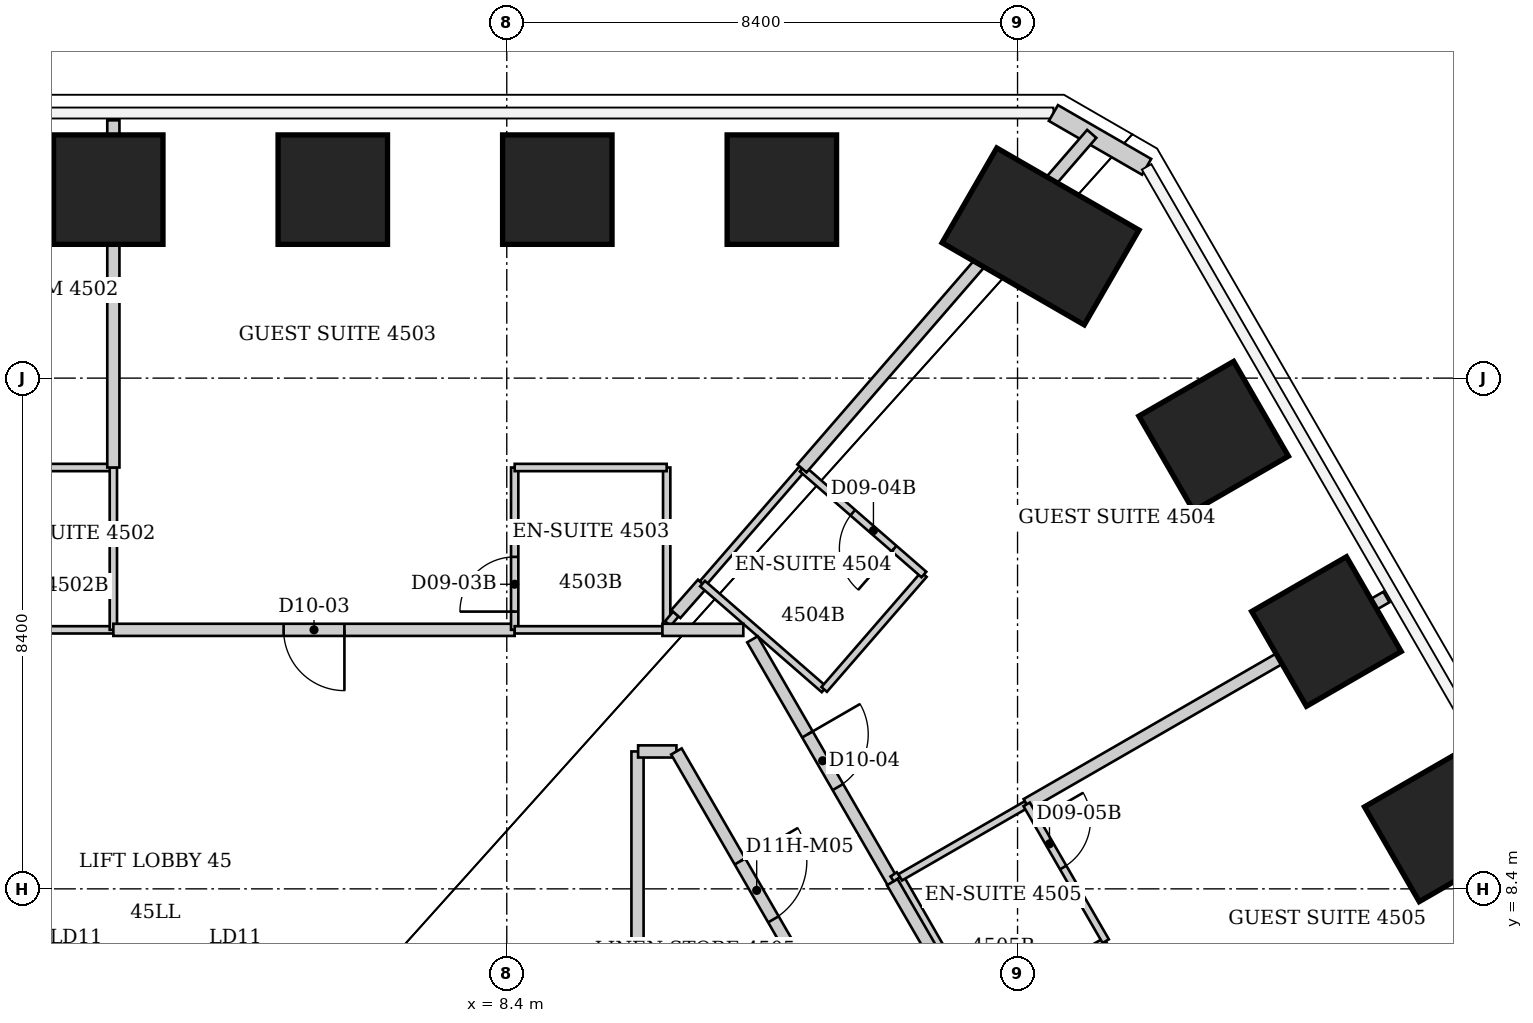
"""IFC4 building model, lengths in metres.
Left out: names, types, materials, properties, quantities, classifications, styles, units other than length and angle.
Written with IfcOpenShell. Run it as: python <this file> out.ifc"""

import sys

from ifc_helpers import new_model, si_unit, direction, frame, frame_2d, origin, origin_2d, place, context, subcontext, project, spatial, rectangle, extrude, element, fill, save


model = new_model("IFC4")
c1 = context("Model", 3, precision=1e-05, world=origin(), true_north=direction((0.0, 1.0)))
c2 = subcontext(c1, "Body", "Model", "MODEL_VIEW")
j1 = project(units=[si_unit("LENGTHUNIT", "METRE"), si_unit("PLANEANGLEUNIT", "RADIAN")], contexts=[c1])
p1 = place(None, origin())
s1 = spatial("IfcSite", under=j1, at=p1, CompositionType="ELEMENT")
p2 = place(p1, origin())
s2 = spatial("IfcBuilding", under=s1, at=p2, CompositionType="ELEMENT")
p3 = place(p2, frame((0.0, 0.0, 183.2)))
s3 = spatial("IfcBuildingStorey", under=s2, at=p3, CompositionType="ELEMENT", Elevation=183.2)
for number, where, z_axis, x_axis in (
    (1, (1.846, 19.9, 0.0), (0.0, 0.0, 1.0), (0.0, 1.0, 0.0)),
    (2, (5.539, 19.9, 0.0), (0.0, 0.0, 1.0), (0.0, 1.0, 0.0)),
    (3, (9.231, 19.9, 0.0), (0.0, 0.0, 1.0), (0.0, 1.0, 0.0)),
    (4, (12.924, 19.9, 0.0), (0.0, 0.0, 1.0), (0.0, 1.0, 0.0)),
):
    element("IfcColumn", number, at=place(p3, frame(where, z_axis=z_axis, x_axis=x_axis)), inside=s3, PredefinedType="COLUMN", context=c2, shape_type="SweptSolid", body=[
        extrude(rectangle(XDim=1.8, YDim=1.8, at=origin_2d()), origin(), (0.0, 0.0, 1.0), 3.8),
    ])
p4 = place(p3, frame((17.178, 19.131, 0.0), z_axis=(0.0, 0.0, 1.0), x_axis=(0.5, 0.866025403784, 0.0)))
e5 = element("IfcColumn", 5, at=p4, inside=s3, PredefinedType="COLUMN", context=c2, shape_type="SweptSolid", body=[
    extrude(rectangle(XDim=1.8, YDim=2.7, at=origin_2d()), origin(), (0.0, 0.0, 1.0), 3.8),
])
for number, where, z_axis, x_axis in (
    (6, (20.025, 15.846, 0.0), (0.0, 0.0, 1.0), (0.866, 0.5, 0.0)),
    (7, (21.88, 12.633, 0.0), (0.0, 0.0, 1.0), (0.866, 0.5, 0.0)),
    (8, (23.735, 9.419, 0.0), (0.0, 0.0, 1.0), (0.866, 0.5, 0.0)),
):
    element("IfcColumn", number, at=place(p3, frame(where, z_axis=z_axis, x_axis=x_axis)), inside=s3, PredefinedType="COLUMN", context=c2, shape_type="SweptSolid", body=[
        extrude(rectangle(XDim=1.8, YDim=1.8, at=origin_2d()), origin(), (0.0, 0.0, 1.0), 3.8),
    ])
p5 = place(p3, frame((17.39, 21.16, 0.0), z_axis=(0.0, 0.0, 1.0), x_axis=(0.866036293601, -0.499981137809, 0.0)))
e9 = element("IfcWall", 9, at=p5, inside=s3, PredefinedType="SOLIDWALL", context=c2, shape_type="SweptSolid", body=[
    extrude(rectangle(XDim=1.77, YDim=0.3, at=frame_2d((0.885, 0.0))), origin(), (0.0, 0.0, 1.0), 3.64),
])
for number, where, z_axis, x_axis in (
    (10, (1.93, 12.66, 0.0), (0.0, 0.0, 1.0), (-1.0, 0.0, 0.0)),
    (11, (1.93, 15.33, 0.0), (0.0, 0.0, 1.0), (-1.0, 0.0, 0.0)),
):
    element("IfcWall", number, at=place(p3, frame(where, z_axis=z_axis, x_axis=x_axis)), inside=s3, PredefinedType="PARTITIONING", context=c2, shape_type="SweptSolid", body=[
        extrude(rectangle(XDim=2.45, YDim=0.12, at=frame_2d((1.225, 0.0))), origin(), (0.0, 0.0, 1.0), 3.64),
    ])
p6 = place(p3, frame((1.93, 15.33, 0.0), z_axis=(0.0, 0.0, 1.0), x_axis=(0.0, -1.0, 0.0)))
e12 = element("IfcWall", 12, at=p6, inside=s3, PredefinedType="PARTITIONING", context=c2, shape_type="SweptSolid", body=[
    extrude(rectangle(XDim=2.67, YDim=0.12, at=frame_2d((1.335, 0.0))), origin(), (0.0, 0.0, 1.0), 3.023),
])
p7 = place(p3, frame((1.93, 21.04, 0.0), z_axis=(0.0, 0.0, 1.0), x_axis=(0.0, -1.0, 0.0)))
e13 = element("IfcWall", 13, at=p7, inside=s3, PredefinedType="PARTITIONING", context=c2, shape_type="SweptSolid", body=[
    extrude(rectangle(XDim=5.71, YDim=0.2, at=frame_2d((2.855, 0.0))), origin(), (0.0, 0.0, 1.0), 3.023),
])
p8 = place(p3, frame((8.53, 12.66, 0.0), z_axis=(0.0, 0.0, 1.0), x_axis=(-1.0, 0.0, 0.0)))
e14 = element("IfcWall", 14, at=p8, inside=s3, PredefinedType="PARTITIONING", context=c2, shape_type="SweptSolid", body=[
    extrude(rectangle(XDim=6.6, YDim=0.2, at=frame_2d((3.3, 0.0))), origin(), (0.0, 0.0, 1.0), 3.64),
])
p9 = place(p8, frame((2.8, 0.0, 0.0)))
e15 = element("IfcOpeningElement", 15, at=p9, cuts=e14, PredefinedType="OPENING", context=c2, shape_type="SweptSolid", body=[
    extrude(rectangle(XDim=1.0, YDim=2.13, at=frame_2d((0.5, 1.065))), frame((0.0, 0.1, 0.0), z_axis=(0.0, -1.0, 0.0), x_axis=(1.0, 0.0, 0.0)), (0.0, 0.0, 1.0), 0.2),
])
p10 = place(p3, frame((8.53, 15.33, 0.0), z_axis=(0.0, 0.0, 1.0), x_axis=(0.0, -1.0, 0.0)))
e16 = element("IfcWall", 16, at=p10, inside=s3, PredefinedType="PARTITIONING", context=c2, shape_type="SweptSolid", body=[
    extrude(rectangle(XDim=2.67, YDim=0.12, at=frame_2d((1.335, 0.0))), origin(), (0.0, 0.0, 1.0), 3.64),
])
p11 = place(p10, frame((1.47, 0.0, 0.0)))
e17 = element("IfcOpeningElement", 17, at=p11, cuts=e16, PredefinedType="OPENING", context=c2, shape_type="SweptSolid", body=[
    extrude(rectangle(XDim=0.9, YDim=2.03, at=frame_2d((0.45, 1.015))), frame((0.0, 0.06, 0.0), z_axis=(0.0, -1.0, 0.0), x_axis=(1.0, 0.0, 0.0)), (0.0, 0.0, 1.0), 0.12),
])
p12 = place(p3, frame((10.55, 6.09, 0.0), z_axis=(0.0, 0.0, 1.0), x_axis=(0.0, 1.0, 0.0)))
e18 = element("IfcWall", 18, at=p12, inside=s3, PredefinedType="PARTITIONING", context=c2, shape_type="SweptSolid", body=[
    extrude(rectangle(XDim=4.57, YDim=0.2, at=frame_2d((2.285, 0.0))), origin(), (0.0, 0.0, 1.0), 3.64),
])
p13 = place(p3, frame((10.56, 10.66, 0.0), z_axis=(0.0, 0.0, 1.0), x_axis=(1.0, 0.0, 0.0)))
e19 = element("IfcWall", 19, at=p13, inside=s3, PredefinedType="PARTITIONING", context=c2, shape_type="SweptSolid", body=[
    extrude(rectangle(XDim=0.63, YDim=0.2, at=frame_2d((0.315, 0.0))), origin(), (0.0, 0.0, 1.0), 3.64),
])
p14 = place(p3, frame((10.96, 12.66, 0.0), z_axis=(0.0, 0.0, 1.0), x_axis=(-1.0, 0.0, 0.0)))
e20 = element("IfcWall", 20, at=p14, inside=s3, PredefinedType="PARTITIONING", context=c2, shape_type="SweptSolid", body=[
    extrude(rectangle(XDim=2.43, YDim=0.12, at=frame_2d((1.215, 0.0))), origin(), (0.0, 0.0, 1.0), 3.64),
])
p15 = place(p3, frame((11.03, 12.74, 0.0), z_axis=(0.0, 0.0, 1.0), x_axis=(0.0, 1.0, 0.0)))
e21 = element("IfcWall", 21, at=p15, inside=s3, PredefinedType="PARTITIONING", context=c2, shape_type="SweptSolid", body=[
    extrude(rectangle(XDim=2.59, YDim=0.12, at=frame_2d((1.295, 0.0))), origin(), (0.0, 0.0, 1.0), 3.038),
])
p16 = place(p3, frame((11.03, 15.33, 0.0), z_axis=(0.0, 0.0, 1.0), x_axis=(-1.0, 0.0, 0.0)))
e22 = element("IfcWall", 22, at=p16, inside=s3, PredefinedType="PARTITIONING", context=c2, shape_type="SweptSolid", body=[
    extrude(rectangle(XDim=2.5, YDim=0.12, at=frame_2d((1.25, 0.0))), origin(), (0.0, 0.0, 1.0), 3.64),
])
p17 = place(p3, frame((11.049, 12.763, 0.0), z_axis=(0.0, 0.0, 1.0), x_axis=(0.639596257895, 0.768711016499, 0.0)))
e23 = element("IfcWall", 23, at=p17, inside=s3, PredefinedType="PARTITIONING", context=c2, shape_type="SweptSolid", body=[
    extrude(rectangle(XDim=0.204, YDim=0.12, at=frame_2d((0.102, 0.0))), origin(), (0.0, 0.0, 1.0), 3.64),
])
p18 = place(p3, frame((11.18, 12.92, 0.0), z_axis=(0.0, 0.0, 1.0), x_axis=(0.660578310858, 0.750757147967, 0.0)))
e24 = element("IfcWall", 24, at=p18, inside=s3, PredefinedType="PARTITIONING", context=c2, shape_type="SweptSolid", body=[
    extrude(rectangle(XDim=0.666, YDim=0.2, at=frame_2d((0.333, 0.0))), origin(), (0.0, 0.0, 1.0), 3.64),
])
p19 = place(p3, frame((11.19, 10.66, 0.0), z_axis=(0.0, 0.0, 1.0), x_axis=(0.500248310865, -0.865881993967, 0.0)))
e25 = element("IfcWall", 25, at=p19, inside=s3, PredefinedType="PARTITIONING", context=c2, shape_type="SweptSolid", body=[
    extrude(rectangle(XDim=5.278, YDim=0.2, at=frame_2d((2.639, 0.0))), origin(), (0.0, 0.0, 1.0), 3.64),
])
p20 = place(p19, frame((2.089, 0.0, 0.0)))
e26 = element("IfcOpeningElement", 26, at=p20, cuts=e25, PredefinedType="OPENING", context=c2, shape_type="SweptSolid", body=[
    extrude(rectangle(XDim=1.1, YDim=2.2, at=frame_2d((0.55, 1.1))), frame((0.0, 0.1, 0.0), z_axis=(0.0, -1.0, 0.0), x_axis=(1.0, 0.0, 0.0)), (0.0, 0.0, 1.0), 0.2),
])
p21 = place(p3, frame((11.62, 13.42, 0.0), z_axis=(0.0, 0.0, 1.0), x_axis=(0.655335308977, 0.755338091723, 0.0)))
e27 = element("IfcWall", 27, at=p21, inside=s3, PredefinedType="PARTITIONING", context=c2, shape_type="SweptSolid", body=[
    extrude(rectangle(XDim=2.502, YDim=0.12, at=frame_2d((1.251, 0.0))), origin(), (0.0, 0.0, 1.0), 3.64),
])
p22 = place(p3, frame((11.62, 13.42, 0.0), z_axis=(0.0, 0.0, 1.0), x_axis=(0.754444902764, -0.656363381591, 0.0)))
e28 = element("IfcWall", 28, at=p22, inside=s3, PredefinedType="PARTITIONING", context=c2, shape_type="SweptSolid", body=[
    extrude(rectangle(XDim=2.651, YDim=0.12, at=frame_2d((1.325, 0.0))), origin(), (0.0, 0.0, 1.0), 3.64),
])
p23 = place(p3, frame((12.29, 12.66, 0.0), z_axis=(0.0, 0.0, 1.0), x_axis=(-1.0, 0.0, 0.0)))
e29 = element("IfcWall", 29, at=p23, inside=s3, PredefinedType="PARTITIONING", context=c2, shape_type="SweptSolid", body=[
    extrude(rectangle(XDim=1.33, YDim=0.2, at=frame_2d((0.665, 0.0))), origin(), (0.0, 0.0, 1.0), 3.64),
])
p24 = place(p3, frame((12.44, 12.504, 0.0), z_axis=(0.0, 0.0, 1.0), x_axis=(0.500616963614, -0.865668906535, 0.0)))
e30 = element("IfcWall", 30, at=p24, inside=s3, PredefinedType="PARTITIONING", context=c2, shape_type="SweptSolid", body=[
    extrude(rectangle(XDim=4.614, YDim=0.2, at=frame_2d((2.307, 0.0))), origin(), (0.0, 0.0, 1.0), 3.64),
])
p25 = place(p24, frame((1.807, 0.0, 0.0)))
e31 = element("IfcOpeningElement", 31, at=p25, cuts=e30, PredefinedType="OPENING", context=c2, shape_type="SweptSolid", body=[
    extrude(rectangle(XDim=1.0, YDim=2.13, at=frame_2d((0.5, 1.065))), frame((0.0, 0.1, 0.0), z_axis=(0.0, -1.0, 0.0), x_axis=(1.0, 0.0, 0.0)), (0.0, 0.0, 1.0), 0.2),
])
p26 = place(p3, frame((13.62, 11.68, 0.0), z_axis=(0.0, 0.0, 1.0), x_axis=(0.655335308977, 0.755338091723, 0.0)))
e32 = element("IfcWall", 32, at=p26, inside=s3, PredefinedType="PARTITIONING", context=c2, shape_type="SweptSolid", body=[
    extrude(rectangle(XDim=2.502, YDim=0.12, at=frame_2d((1.251, 0.0))), origin(), (0.0, 0.0, 1.0), 3.64),
])
p27 = place(p3, frame((14.767, 8.521, 0.0), z_axis=(0.0, 0.0, 1.0), x_axis=(0.831142316784, 0.55605975331, 0.0)))
e33 = element("IfcWall", 33, at=p27, inside=s3, PredefinedType="PARTITIONING", context=c2, shape_type="SweptSolid", body=[
    extrude(rectangle(XDim=0.124, YDim=0.2, at=frame_2d((0.062, 0.0))), origin(), (0.0, 0.0, 1.0), 3.64),
])
p28 = place(p3, frame((14.87, 8.59, 0.0), z_axis=(0.0, 0.0, 1.0), x_axis=(0.498557331759, -0.866856728041, 0.0)))
e34 = element("IfcWall", 34, at=p28, inside=s3, PredefinedType="PARTITIONING", context=c2, shape_type="SweptSolid", body=[
    extrude(rectangle(XDim=2.607, YDim=0.12, at=frame_2d((1.304, 0.0))), origin(), (0.0, 0.0, 1.0), 3.64),
])
p29 = place(p3, frame((14.87, 8.59, 0.0), z_axis=(0.0, 0.0, 1.0), x_axis=(0.866177122335, 0.499737123639, 0.0)))
e35 = element("IfcWall", 35, at=p29, inside=s3, PredefinedType="PARTITIONING", context=c2, shape_type="SweptSolid", body=[
    extrude(rectangle(XDim=2.401, YDim=0.12, at=frame_2d((1.201, 0.0))), origin(), (0.0, 0.0, 1.0), 2.878),
])
p30 = place(p3, frame((15.26, 13.57, 0.0), z_axis=(0.0, 0.0, 1.0), x_axis=(-0.754444902764, 0.656363381591, 0.0)))
e36 = element("IfcWall", 36, at=p30, inside=s3, PredefinedType="PARTITIONING", context=c2, shape_type="SweptSolid", body=[
    extrude(rectangle(XDim=2.651, YDim=0.12, at=frame_2d((1.325, 0.0))), origin(), (0.0, 0.0, 1.0), 3.64),
])
p31 = place(p30, frame((0.65, 0.0, 0.0)))
e37 = element("IfcOpeningElement", 37, at=p31, cuts=e36, PredefinedType="OPENING", context=c2, shape_type="SweptSolid", body=[
    extrude(rectangle(XDim=0.9, YDim=2.03, at=frame_2d((0.45, 1.015))), frame((0.0, 0.06, 0.0), z_axis=(0.0, -1.0, 0.0), x_axis=(1.0, 0.0, 0.0)), (0.0, 0.0, 1.0), 0.12),
])
p32 = place(p3, frame((16.17, 6.33, 0.0), z_axis=(0.0, 0.0, 1.0), x_axis=(0.864396442809, 0.502810888564, 0.0)))
e38 = element("IfcWall", 38, at=p32, inside=s3, PredefinedType="PARTITIONING", context=c2, shape_type="SweptSolid", body=[
    extrude(rectangle(XDim=2.406, YDim=0.12, at=frame_2d((1.203, 0.0))), origin(), (0.0, 0.0, 1.0), 3.64),
])
p33 = place(p3, frame((16.95, 9.79, 0.0), z_axis=(0.0, 0.0, 1.0), x_axis=(0.866371236465, 0.499400521251, 0.0)))
e39 = element("IfcWall", 39, at=p33, inside=s3, PredefinedType="PARTITIONING", context=c2, shape_type="SweptSolid", body=[
    extrude(rectangle(XDim=6.829, YDim=0.2, at=frame_2d((3.414, 0.0))), origin(), (0.0, 0.0, 1.0), 2.878),
])
p34 = place(p3, frame((17.14, 4.37, 0.0), z_axis=(0.0, 0.0, 1.0), x_axis=(-0.501524901322, 0.865143209737, 0.0)))
e40 = element("IfcWall", 40, at=p34, inside=s3, PredefinedType="PARTITIONING", context=c2, shape_type="SweptSolid", body=[
    extrude(rectangle(XDim=4.785, YDim=0.2, at=frame_2d((2.393, 0.0))), origin(), (0.0, 0.0, 1.0), 3.64),
])
p35 = place(p34, frame((1.05, 0.0, 0.0)))
e41 = element("IfcOpeningElement", 41, at=p35, cuts=e40, PredefinedType="OPENING", context=c2, shape_type="SweptSolid", body=[
    extrude(rectangle(XDim=1.0, YDim=2.13, at=frame_2d((0.5, 1.065))), frame((0.0, 0.1, 0.0), z_axis=(0.0, -1.0, 0.0), x_axis=(1.0, 0.0, 0.0)), (0.0, 0.0, 1.0), 0.2),
])
p36 = place(p3, frame((18.02, 20.817, 0.0), z_axis=(0.0, 0.0, 1.0), x_axis=(-0.654701954033, -0.755887128733, 0.0)))
e42 = element("IfcWall", 42, at=p36, inside=s3, PredefinedType="PARTITIONING", context=c2, shape_type="SweptSolid", body=[
    extrude(rectangle(XDim=7.28, YDim=0.2, at=frame_2d((3.64, 0.0))), origin(), (0.0, 0.0, 1.0), 3.64),
])
p37 = place(p3, frame((18.25, 7.54, 0.0), z_axis=(0.0, 0.0, 1.0), x_axis=(-0.500291685314, 0.865856933682, 0.0)))
e43 = element("IfcWall", 43, at=p37, inside=s3, PredefinedType="PARTITIONING", context=c2, shape_type="SweptSolid", body=[
    extrude(rectangle(XDim=2.599, YDim=0.12, at=frame_2d((1.299, 0.0))), origin(), (0.0, 0.0, 1.0), 3.64),
])
p38 = place(p37, frame((1.399, 0.0, 0.0)))
e44 = element("IfcOpeningElement", 44, at=p38, cuts=e43, PredefinedType="OPENING", context=c2, shape_type="SweptSolid", body=[
    extrude(rectangle(XDim=0.9, YDim=2.03, at=frame_2d((0.45, 1.015))), frame((0.0, 0.06, 0.0), z_axis=(0.0, -1.0, 0.0), x_axis=(1.0, 0.0, 0.0)), (0.0, 0.0, 1.0), 0.12),
])
p39 = place(p9, origin())
e45 = element("IfcDoor", 45, at=p39, inside=s3, OperationType="SINGLE_SWING_LEFT", PredefinedType="DOOR", context=c2, shape_type="SweptSolid", body=[
    extrude(rectangle(XDim=1.0, YDim=2.13, at=frame_2d((0.5, 1.065))), frame((0.0, 0.025, 0.0), z_axis=(0.0, -1.0, 0.0), x_axis=(1.0, 0.0, 0.0)), (0.0, 0.0, 1.0), 0.05),
])
fill(e15, e45)
p40 = place(p11, origin())
e46 = element("IfcDoor", 46, at=p40, inside=s3, OperationType="SINGLE_SWING_RIGHT", PredefinedType="DOOR", context=c2, shape_type="SweptSolid", body=[
    extrude(rectangle(XDim=0.9, YDim=2.03, at=frame_2d((0.45, 1.015))), frame((0.0, 0.025, 0.0), z_axis=(0.0, -1.0, 0.0), x_axis=(1.0, 0.0, 0.0)), (0.0, 0.0, 1.0), 0.05),
])
fill(e17, e46)
p41 = place(p25, origin())
e47 = element("IfcDoor", 47, at=p41, inside=s3, OperationType="SINGLE_SWING_LEFT", PredefinedType="DOOR", context=c2, shape_type="SweptSolid", body=[
    extrude(rectangle(XDim=1.0, YDim=2.13, at=frame_2d((0.5, 1.065))), frame((0.0, 0.025, 0.0), z_axis=(0.0, -1.0, 0.0), x_axis=(1.0, 0.0, 0.0)), (0.0, 0.0, 1.0), 0.05),
])
fill(e31, e47)
p42 = place(p31, origin())
e48 = element("IfcDoor", 48, at=p42, inside=s3, OperationType="SINGLE_SWING_LEFT", PredefinedType="DOOR", context=c2, shape_type="SweptSolid", body=[
    extrude(rectangle(XDim=0.9, YDim=2.03, at=frame_2d((0.45, 1.015))), frame((0.0, 0.025, 0.0), z_axis=(0.0, -1.0, 0.0), x_axis=(1.0, 0.0, 0.0)), (0.0, 0.0, 1.0), 0.05),
])
fill(e37, e48)
p43 = place(p38, origin())
e49 = element("IfcDoor", 49, at=p43, inside=s3, OperationType="SINGLE_SWING_RIGHT", PredefinedType="DOOR", context=c2, shape_type="SweptSolid", body=[
    extrude(rectangle(XDim=0.9, YDim=2.03, at=frame_2d((0.45, 1.015))), frame((0.0, 0.025, 0.0), z_axis=(0.0, -1.0, 0.0), x_axis=(1.0, 0.0, 0.0)), (0.0, 0.0, 1.0), 0.05),
])
fill(e44, e49)
p44 = place(p20, origin())
e50 = element("IfcDoor", 50, at=p44, inside=s3, OperationType="SINGLE_SWING_LEFT", PredefinedType="DOOR", context=c2, shape_type="SweptSolid", body=[
    extrude(rectangle(XDim=1.1, YDim=2.2, at=frame_2d((0.55, 1.1))), frame((0.0, 0.025, 0.0), z_axis=(0.0, -1.0, 0.0), x_axis=(1.0, 0.0, 0.0)), (0.0, 0.0, 1.0), 0.05),
])
fill(e26, e50)
save(model, sys.argv[1])
